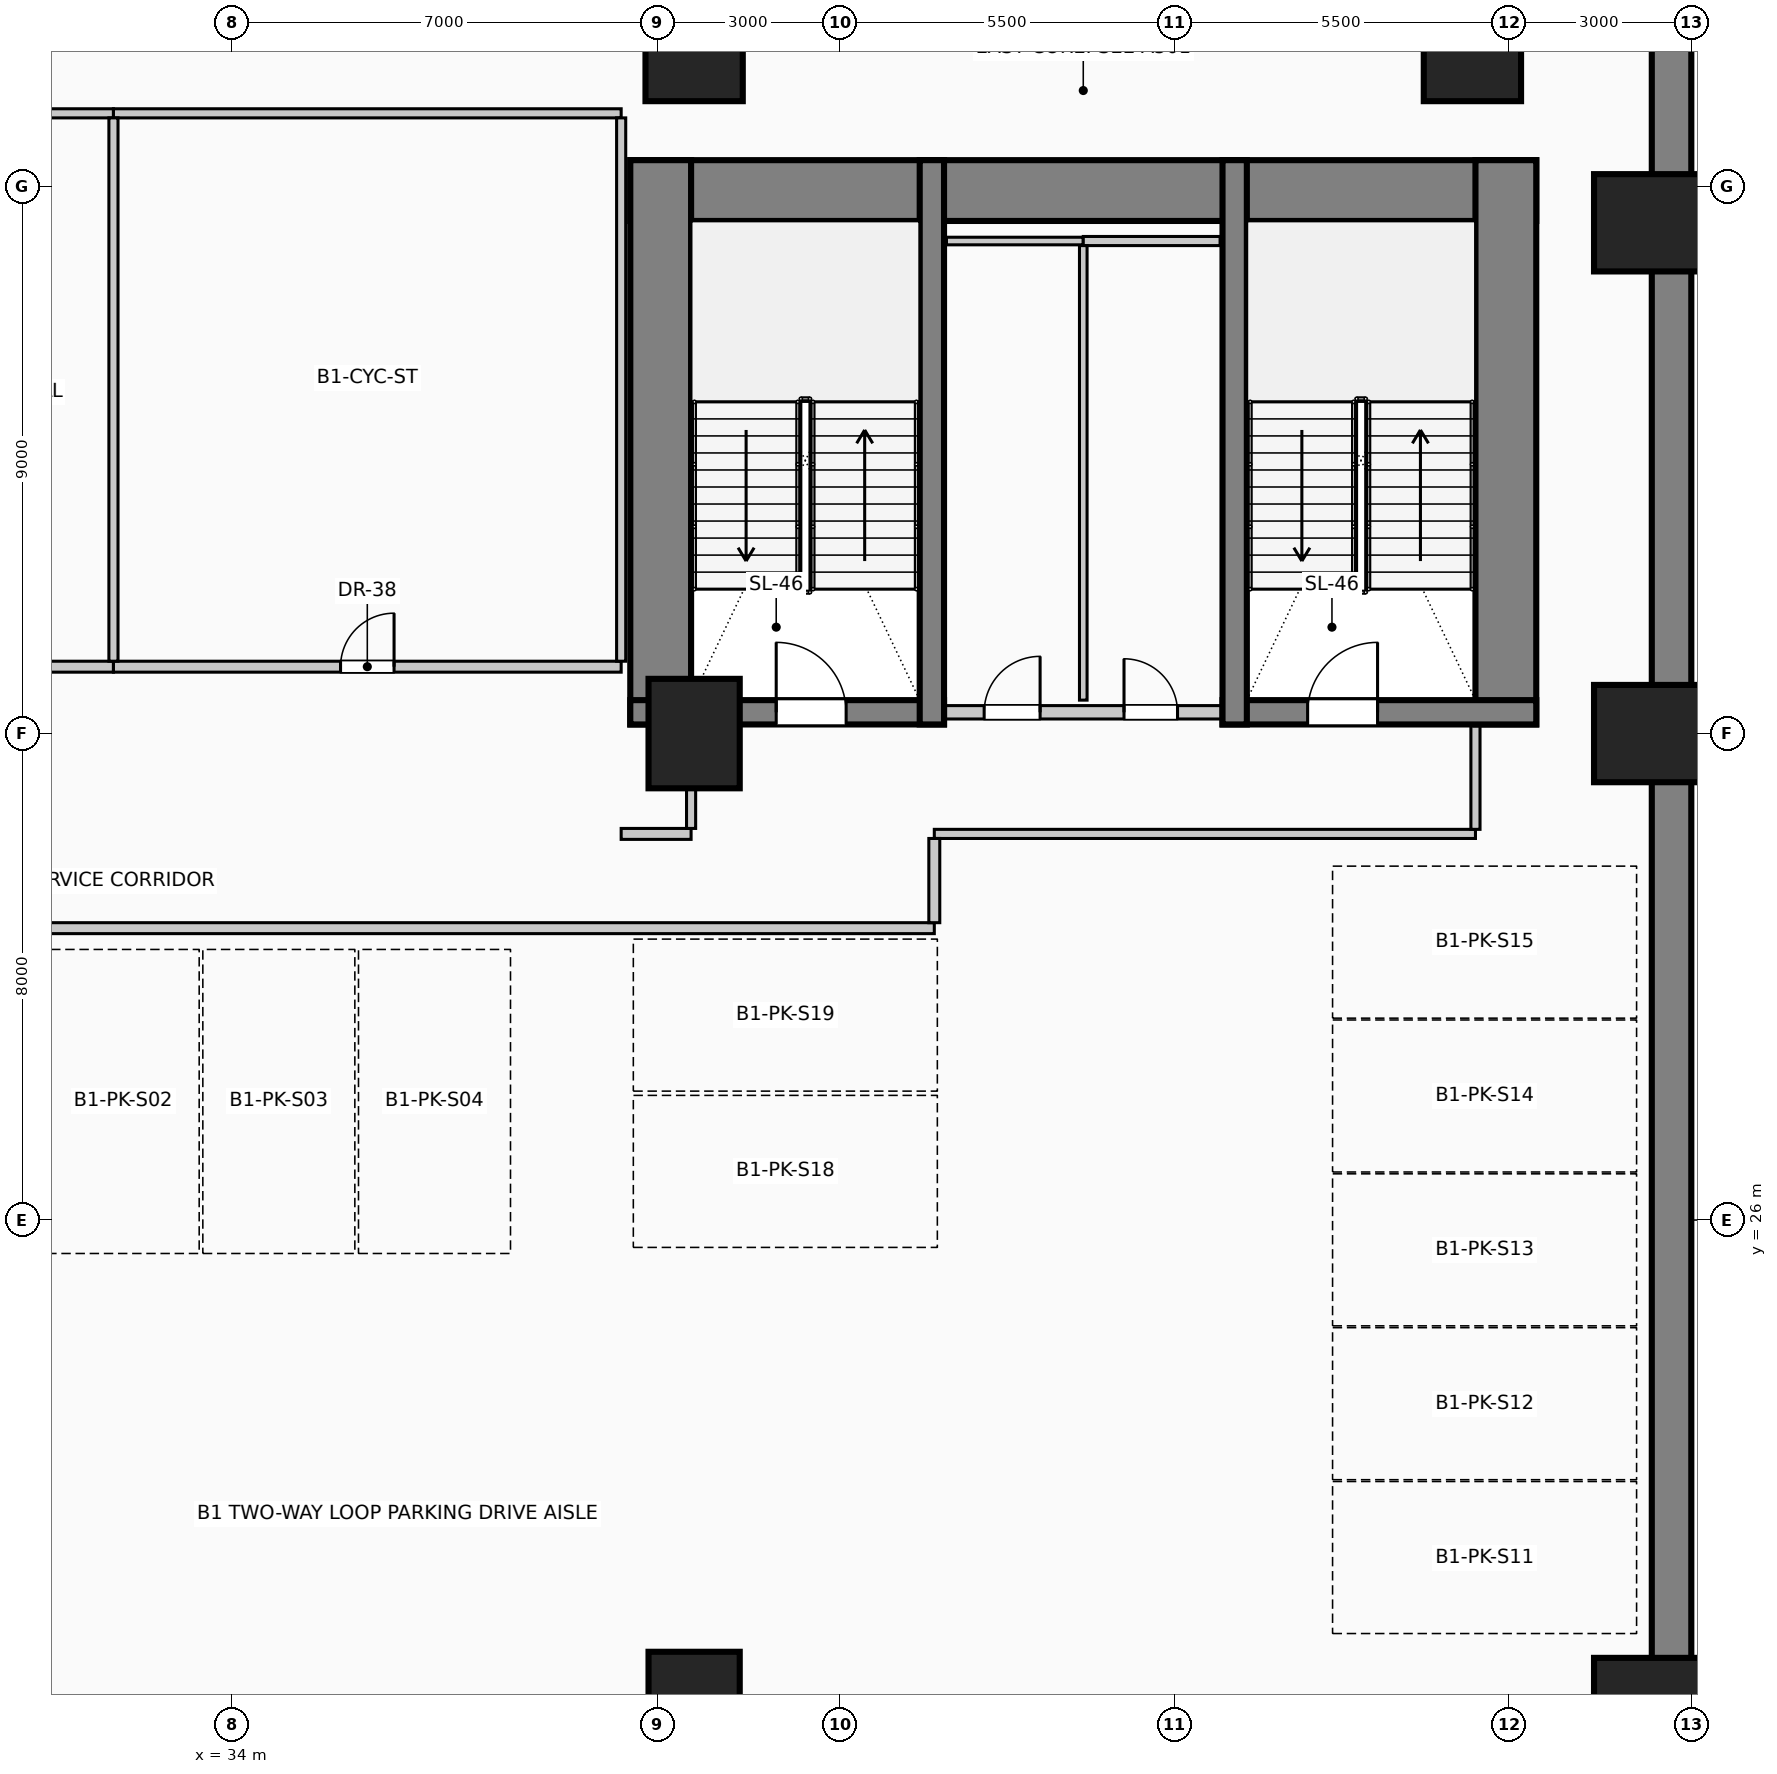
"""IFC4 building model, lengths in metres.
Left out: names, types, materials, properties, quantities, classifications, styles, units other than length and angle.
Written with IfcOpenShell. Run it as: python <this file> out.ifc"""

import sys

from ifc_helpers import new_model, si_unit, direction, frame, frame_2d, origin, origin_2d, place, context, subcontext, project, spatial, rectangle, extrude, element, fill, save


model = new_model("IFC4")
c1 = context("Model", 3, precision=1e-05, world=origin(), true_north=direction((0.0, 1.0)))
c2 = subcontext(c1, "Body", "Model", "MODEL_VIEW")
j1 = project(units=[si_unit("LENGTHUNIT", "METRE"), si_unit("PLANEANGLEUNIT", "RADIAN")], contexts=[c1])
p1 = place(None, origin())
s1 = spatial("IfcSite", under=j1, at=p1, CompositionType="ELEMENT")
p2 = place(p1, origin())
s2 = spatial("IfcBuilding", under=s1, at=p2, CompositionType="ELEMENT")
p3 = place(p2, frame((0.0, 0.0, -4.5)))
s3 = spatial("IfcBuildingStorey", under=s2, at=p3, CompositionType="ELEMENT", Elevation=-4.5)
p4 = place(p3, frame((57.675, 46.0, 0.0), z_axis=(0.0, 0.0, 1.0), x_axis=(0.0, -1.0, 0.0)))
e1 = element("IfcWall", 1, at=p4, inside=s3, PredefinedType="SOLIDWALL", context=c2, shape_type="SweptSolid", body=[
    extrude(rectangle(XDim=46.0, YDim=0.65, at=frame_2d((23.0, 0.0))), origin(), (0.0, 0.0, 1.0), 4.5),
])
p5 = place(p3, frame((40.55, 42.93, 0.0), z_axis=(0.0, 0.0, 1.0), x_axis=(1.0, 0.0, 0.0)))
e2 = element("IfcWall", 2, at=p5, inside=s3, PredefinedType="SHEAR", context=c2, shape_type="SweptSolid", body=[
    extrude(rectangle(XDim=14.9, YDim=1.0, at=frame_2d((7.45, 0.0))), origin(), (0.0, 0.0, 1.0), 4.5),
])
for number, where, z_axis, x_axis in (
    (3, (41.05, 34.15, 0.0), (0.0, 0.0, 1.0), (0.0, 1.0, 0.0)),
    (4, (54.95, 34.15, 0.0), (0.0, 0.0, 1.0), (0.0, 1.0, 0.0)),
):
    element("IfcWall", number, at=place(p3, frame(where, z_axis=z_axis, x_axis=x_axis)), inside=s3, PredefinedType="SHEAR", context=c2, shape_type="SweptSolid", body=[
        extrude(rectangle(XDim=9.28, YDim=1.0, at=frame_2d((4.64, 0.0))), origin(), (0.0, 0.0, 1.0), 4.5),
    ])
p6 = place(p3, frame((40.55, 34.35, 0.0), z_axis=(0.0, 0.0, 1.0), x_axis=(1.0, 0.0, 0.0)))
e5 = element("IfcWall", 5, at=p6, inside=s3, PredefinedType="SHEAR", context=c2, shape_type="SweptSolid", body=[
    extrude(rectangle(XDim=5.16, YDim=0.4, at=frame_2d((2.58, 0.0))), origin(), (0.0, 0.0, 1.0), 4.5),
])
p7 = place(p6, frame((2.4, 0.0, 0.0)))
e6 = element("IfcOpeningElement", 6, at=p7, cuts=e5, PredefinedType="OPENING", context=c2, shape_type="SweptSolid", body=[
    extrude(rectangle(XDim=1.15, YDim=2.2, at=frame_2d((0.575, 1.1))), frame((0.0, 0.21, 0.0), z_axis=(0.0, -1.0, 0.0), x_axis=(1.0, 0.0, 0.0)), (0.0, 0.0, 1.0), 0.42),
])
p8 = place(p3, frame((45.51, 34.15, 0.0), z_axis=(0.0, 0.0, 1.0), x_axis=(0.0, 1.0, 0.0)))
e7 = element("IfcWall", 7, at=p8, inside=s3, PredefinedType="SHEAR", context=c2, shape_type="SweptSolid", body=[
    extrude(rectangle(XDim=9.28, YDim=0.4, at=frame_2d((4.64, 0.0))), origin(), (0.0, 0.0, 1.0), 4.5),
])
p9 = place(p3, frame((50.29, 34.35, 0.0), z_axis=(0.0, 0.0, 1.0), x_axis=(1.0, 0.0, 0.0)))
e8 = element("IfcWall", 8, at=p9, inside=s3, PredefinedType="SHEAR", context=c2, shape_type="SweptSolid", body=[
    extrude(rectangle(XDim=5.16, YDim=0.4, at=frame_2d((2.58, 0.0))), origin(), (0.0, 0.0, 1.0), 4.5),
])
p10 = place(p9, frame((1.4, 0.0, 0.0)))
e9 = element("IfcOpeningElement", 9, at=p10, cuts=e8, PredefinedType="OPENING", context=c2, shape_type="SweptSolid", body=[
    extrude(rectangle(XDim=1.15, YDim=2.2, at=frame_2d((0.575, 1.1))), frame((0.0, 0.21, 0.0), z_axis=(0.0, -1.0, 0.0), x_axis=(1.0, 0.0, 0.0)), (0.0, 0.0, 1.0), 0.42),
])
p11 = place(p3, frame((50.49, 34.15, 0.0), z_axis=(0.0, 0.0, 1.0), x_axis=(0.0, 1.0, 0.0)))
e10 = element("IfcWall", 10, at=p11, inside=s3, PredefinedType="SHEAR", context=c2, shape_type="SweptSolid", body=[
    extrude(rectangle(XDim=9.28, YDim=0.4, at=frame_2d((4.64, 0.0))), origin(), (0.0, 0.0, 1.0), 4.5),
])
for number, where, z_axis, x_axis in (
    (11, (41.6, 45.4, 0.0), (0.0, 0.0, 1.0), (1.0, 0.0, 0.0)),
    (12, (54.4, 45.4, 0.0), (0.0, 0.0, 1.0), (1.0, 0.0, 0.0)),
    (13, (57.4, 18.0, 0.0), (0.0, 0.0, 1.0), (0.0, 1.0, 0.0)),
    (14, (57.4, 34.0, 0.0), (0.0, 0.0, 1.0), (0.0, 1.0, 0.0)),
    (15, (57.4, 42.4, 0.0), (0.0, 0.0, 1.0), (0.0, 1.0, 0.0)),
):
    element("IfcColumn", number, at=place(p3, frame(where, z_axis=z_axis, x_axis=x_axis)), inside=s3, PredefinedType="COLUMN", context=c2, shape_type="SweptSolid", body=[
        extrude(rectangle(XDim=1.6, YDim=2.0, at=origin_2d()), origin(), (0.0, 0.0, 1.0), 4.5),
    ])
for number, where, z_axis, x_axis in (
    (16, (41.6, 18.0, 0.0), (0.0, 0.0, 1.0), (1.0, 0.0, 0.0)),
    (17, (41.6, 34.0, 0.0), (0.0, 0.0, 1.0), (1.0, 0.0, 0.0)),
):
    element("IfcColumn", number, at=place(p3, frame(where, z_axis=z_axis, x_axis=x_axis)), inside=s3, PredefinedType="COLUMN", context=c2, shape_type="SweptSolid", body=[
        extrude(rectangle(XDim=1.5, YDim=1.8, at=origin_2d()), origin(), (0.0, 0.0, 1.0), 4.5),
    ])
p12 = place(p3, frame((45.72, 34.35, 0.0), z_axis=(0.0, 0.0, 1.0), x_axis=(1.0, 0.0, 0.0)))
e18 = element("IfcWall", 18, at=p12, inside=s3, PredefinedType="PARTITIONING", context=c2, shape_type="SweptSolid", body=[
    extrude(rectangle(XDim=4.56, YDim=0.22, at=frame_2d((2.28, 0.0))), origin(), (0.0, 0.0, 1.0), 3.145),
])
p13 = place(p12, frame((0.65, 0.0, 0.0)))
e19 = element("IfcOpeningElement", 19, at=p13, cuts=e18, PredefinedType="OPENING", context=c2, shape_type="SweptSolid", body=[
    extrude(rectangle(XDim=0.92, YDim=2.1, at=frame_2d((0.46, 1.05))), frame((0.0, 0.12, 0.0), z_axis=(0.0, -1.0, 0.0), x_axis=(1.0, 0.0, 0.0)), (0.0, 0.0, 1.0), 0.24),
])
p14 = place(p12, frame((2.95, 0.0, 0.0)))
e20 = element("IfcOpeningElement", 20, at=p14, cuts=e18, PredefinedType="OPENING", context=c2, shape_type="SweptSolid", body=[
    extrude(rectangle(XDim=0.88, YDim=2.1, at=frame_2d((0.44, 1.05))), frame((0.0, 0.12, 0.0), z_axis=(0.0, -1.0, 0.0), x_axis=(1.0, 0.0, 0.0)), (0.0, 0.0, 1.0), 0.24),
])
p15 = place(p3, frame((15.85, 30.8, 0.0), z_axis=(0.0, 0.0, 1.0), x_axis=(1.0, 0.0, 0.0)))
e21 = element("IfcWall", 21, at=p15, inside=s3, PredefinedType="PARTITIONING", context=c2, shape_type="SweptSolid", body=[
    extrude(rectangle(XDim=29.7, YDim=0.18, at=frame_2d((14.85, 0.0))), origin(), (0.0, 0.0, 1.0), 4.1),
])
p16 = place(p3, frame((40.4, 32.35, 0.0), z_axis=(0.0, 0.0, 1.0), x_axis=(1.0, 0.0, 0.0)))
e22 = element("IfcWall", 22, at=p16, inside=s3, PredefinedType="PARTITIONING", context=c2, shape_type="SweptSolid", body=[
    extrude(rectangle(XDim=1.15, YDim=0.18, at=frame_2d((0.575, 0.0))), origin(), (0.0, 0.0, 1.0), 4.1),
])
p17 = place(p3, frame((45.55, 32.35, 0.0), z_axis=(0.0, 0.0, 1.0), x_axis=(1.0, 0.0, 0.0)))
e23 = element("IfcWall", 23, at=p17, inside=s3, PredefinedType="PARTITIONING", context=c2, shape_type="SweptSolid", body=[
    extrude(rectangle(XDim=8.9, YDim=0.15, at=frame_2d((4.45, 0.0))), origin(), (0.0, 0.0, 1.0), 4.1),
])
p18 = place(p3, frame((30.2, 35.1, 0.0), z_axis=(0.0, 0.0, 1.0), x_axis=(1.0, 0.0, 0.0)))
e24 = element("IfcWall", 24, at=p18, inside=s3, PredefinedType="PARTITIONING", context=c2, shape_type="SweptSolid", body=[
    extrude(rectangle(XDim=1.85, YDim=0.18, at=frame_2d((0.925, 0.0))), origin(), (0.0, 0.0, 1.0), 4.1),
])
p19 = place(p3, frame((32.05, 35.1, 0.0), z_axis=(0.0, 0.0, 1.0), x_axis=(1.0, 0.0, 0.0)))
e25 = element("IfcWall", 25, at=p19, inside=s3, PredefinedType="PARTITIONING", context=c2, shape_type="SweptSolid", body=[
    extrude(rectangle(XDim=8.35, YDim=0.18, at=frame_2d((4.175, 0.0))), origin(), (0.0, 0.0, 1.0), 4.1),
])
p20 = place(p19, frame((3.735, 0.0, 0.0)))
e26 = element("IfcOpeningElement", 26, at=p20, cuts=e25, PredefinedType="OPENING", context=c2, shape_type="SweptSolid", body=[
    extrude(rectangle(XDim=0.88, YDim=2.1, at=frame_2d((0.44, 1.05))), frame((0.0, 0.1, 0.0), z_axis=(0.0, -1.0, 0.0), x_axis=(1.0, 0.0, 0.0)), (0.0, 0.0, 1.0), 0.2),
])
p21 = place(p3, frame((45.75, 42.1, 0.0), z_axis=(0.0, 0.0, 1.0), x_axis=(1.0, 0.0, 0.0)))
e27 = element("IfcWall", 27, at=p21, inside=s3, PredefinedType="PARTITIONING", context=c2, shape_type="SweptSolid", body=[
    extrude(rectangle(XDim=2.25, YDim=0.125, at=frame_2d((1.125, 0.0))), origin(), (0.0, 0.0, 1.0), 4.1),
])
p22 = place(p3, frame((48.0, 42.1, 0.0), z_axis=(0.0, 0.0, 1.0), x_axis=(1.0, 0.0, 0.0)))
e28 = element("IfcWall", 28, at=p22, inside=s3, PredefinedType="PARTITIONING", context=c2, shape_type="SweptSolid", body=[
    extrude(rectangle(XDim=2.25, YDim=0.15, at=frame_2d((1.125, 0.0))), origin(), (0.0, 0.0, 1.0), 4.1),
])
p23 = place(p3, frame((17.55, 44.2, 0.0), z_axis=(0.0, 0.0, 1.0), x_axis=(1.0, 0.0, 0.0)))
e29 = element("IfcWall", 29, at=p23, inside=s3, PredefinedType="PARTITIONING", context=c2, shape_type="SweptSolid", body=[
    extrude(rectangle(XDim=14.5, YDim=0.15, at=frame_2d((7.25, 0.0))), origin(), (0.0, 0.0, 1.0), 4.1),
])
p24 = place(p3, frame((32.05, 44.2, 0.0), z_axis=(0.0, 0.0, 1.0), x_axis=(1.0, 0.0, 0.0)))
e30 = element("IfcWall", 30, at=p24, inside=s3, PredefinedType="PARTITIONING", context=c2, shape_type="SweptSolid", body=[
    extrude(rectangle(XDim=8.35, YDim=0.15, at=frame_2d((4.175, 0.0))), origin(), (0.0, 0.0, 1.0), 4.1),
])
for number, where, z_axis, x_axis in (
    (31, (32.05, 35.19, 0.0), (0.0, 0.0, 1.0), (0.0, 1.0, 0.0)),
    (32, (40.4, 35.19, 0.0), (0.0, 0.0, 1.0), (0.0, 1.0, 0.0)),
):
    element("IfcWall", number, at=place(p3, frame(where, z_axis=z_axis, x_axis=x_axis)), inside=s3, PredefinedType="PARTITIONING", context=c2, shape_type="SweptSolid", body=[
        extrude(rectangle(XDim=8.935, YDim=0.15, at=frame_2d((4.468, 0.0))), origin(), (0.0, 0.0, 1.0), 4.1),
    ])
p25 = place(p3, frame((41.55, 32.44, 0.0), z_axis=(0.0, 0.0, 1.0), x_axis=(0.0, 1.0, 0.0)))
e33 = element("IfcWall", 33, at=p25, inside=s3, PredefinedType="PARTITIONING", context=c2, shape_type="SweptSolid", body=[
    extrude(rectangle(XDim=0.66, YDim=0.15, at=frame_2d((0.33, 0.0))), origin(), (0.0, 0.0, 1.0), 3.145),
])
p26 = place(p3, frame((45.55, 30.89, 0.0), z_axis=(0.0, 0.0, 1.0), x_axis=(0.0, 1.0, 0.0)))
e34 = element("IfcWall", 34, at=p26, inside=s3, PredefinedType="PARTITIONING", context=c2, shape_type="SweptSolid", body=[
    extrude(rectangle(XDim=1.385, YDim=0.18, at=frame_2d((0.692, 0.0))), origin(), (0.0, 0.0, 1.0), 4.1),
])
p27 = place(p3, frame((48.0, 34.55, 0.0), z_axis=(0.0, 0.0, 1.0), x_axis=(0.0, 1.0, 0.0)))
e35 = element("IfcWall", 35, at=p27, inside=s3, PredefinedType="PARTITIONING", context=c2, shape_type="SweptSolid", body=[
    extrude(rectangle(XDim=7.475, YDim=0.125, at=frame_2d((3.737, 0.0))), origin(), (0.0, 0.0, 1.0), 4.1),
])
p28 = place(p3, frame((54.45, 32.425, 0.0), z_axis=(0.0, 0.0, 1.0), x_axis=(0.0, 1.0, 0.0)))
e36 = element("IfcWall", 36, at=p28, inside=s3, PredefinedType="PARTITIONING", context=c2, shape_type="SweptSolid", body=[
    extrude(rectangle(XDim=1.725, YDim=0.15, at=frame_2d((0.862, 0.0))), origin(), (0.0, 0.0, 1.0), 4.1),
])
p29 = place(p7, origin())
e37 = element("IfcDoor", 37, at=p29, inside=s3, OperationType="SINGLE_SWING_LEFT", PredefinedType="DOOR", context=c2, shape_type="SweptSolid", body=[
    extrude(rectangle(XDim=1.15, YDim=2.2, at=frame_2d((0.575, 1.1))), frame((0.0, 0.025, 0.0), z_axis=(0.0, -1.0, 0.0), x_axis=(1.0, 0.0, 0.0)), (0.0, 0.0, 1.0), 0.05),
])
fill(e6, e37)
p30 = place(p13, origin())
e38 = element("IfcDoor", 38, at=p30, inside=s3, OperationType="SINGLE_SWING_RIGHT", PredefinedType="DOOR", context=c2, shape_type="SweptSolid", body=[
    extrude(rectangle(XDim=0.92, YDim=2.1, at=frame_2d((0.46, 1.05))), frame((0.0, 0.025, 0.0), z_axis=(0.0, -1.0, 0.0), x_axis=(1.0, 0.0, 0.0)), (0.0, 0.0, 1.0), 0.05),
])
fill(e19, e38)
p31 = place(p14, origin())
e39 = element("IfcDoor", 39, at=p31, inside=s3, OperationType="SINGLE_SWING_LEFT", PredefinedType="DOOR", context=c2, shape_type="SweptSolid", body=[
    extrude(rectangle(XDim=0.88, YDim=2.1, at=frame_2d((0.44, 1.05))), frame((0.0, 0.025, 0.0), z_axis=(0.0, -1.0, 0.0), x_axis=(1.0, 0.0, 0.0)), (0.0, 0.0, 1.0), 0.05),
])
fill(e20, e39)
p32 = place(p10, origin())
e40 = element("IfcDoor", 40, at=p32, inside=s3, OperationType="SINGLE_SWING_RIGHT", PredefinedType="DOOR", context=c2, shape_type="SweptSolid", body=[
    extrude(rectangle(XDim=1.15, YDim=2.2, at=frame_2d((0.575, 1.1))), frame((0.0, 0.025, 0.0), z_axis=(0.0, -1.0, 0.0), x_axis=(1.0, 0.0, 0.0)), (0.0, 0.0, 1.0), 0.05),
])
fill(e9, e40)
p33 = place(p20, origin())
e41 = element("IfcDoor", 41, at=p33, inside=s3, OperationType="SINGLE_SWING_RIGHT", PredefinedType="DOOR", context=c2, shape_type="SweptSolid", body=[
    extrude(rectangle(XDim=0.88, YDim=2.1, at=frame_2d((0.44, 1.05))), frame((0.0, 0.025, 0.0), z_axis=(0.0, -1.0, 0.0), x_axis=(1.0, 0.0, 0.0)), (0.0, 0.0, 1.0), 0.05),
])
fill(e26, e41)
save(model, sys.argv[1])
